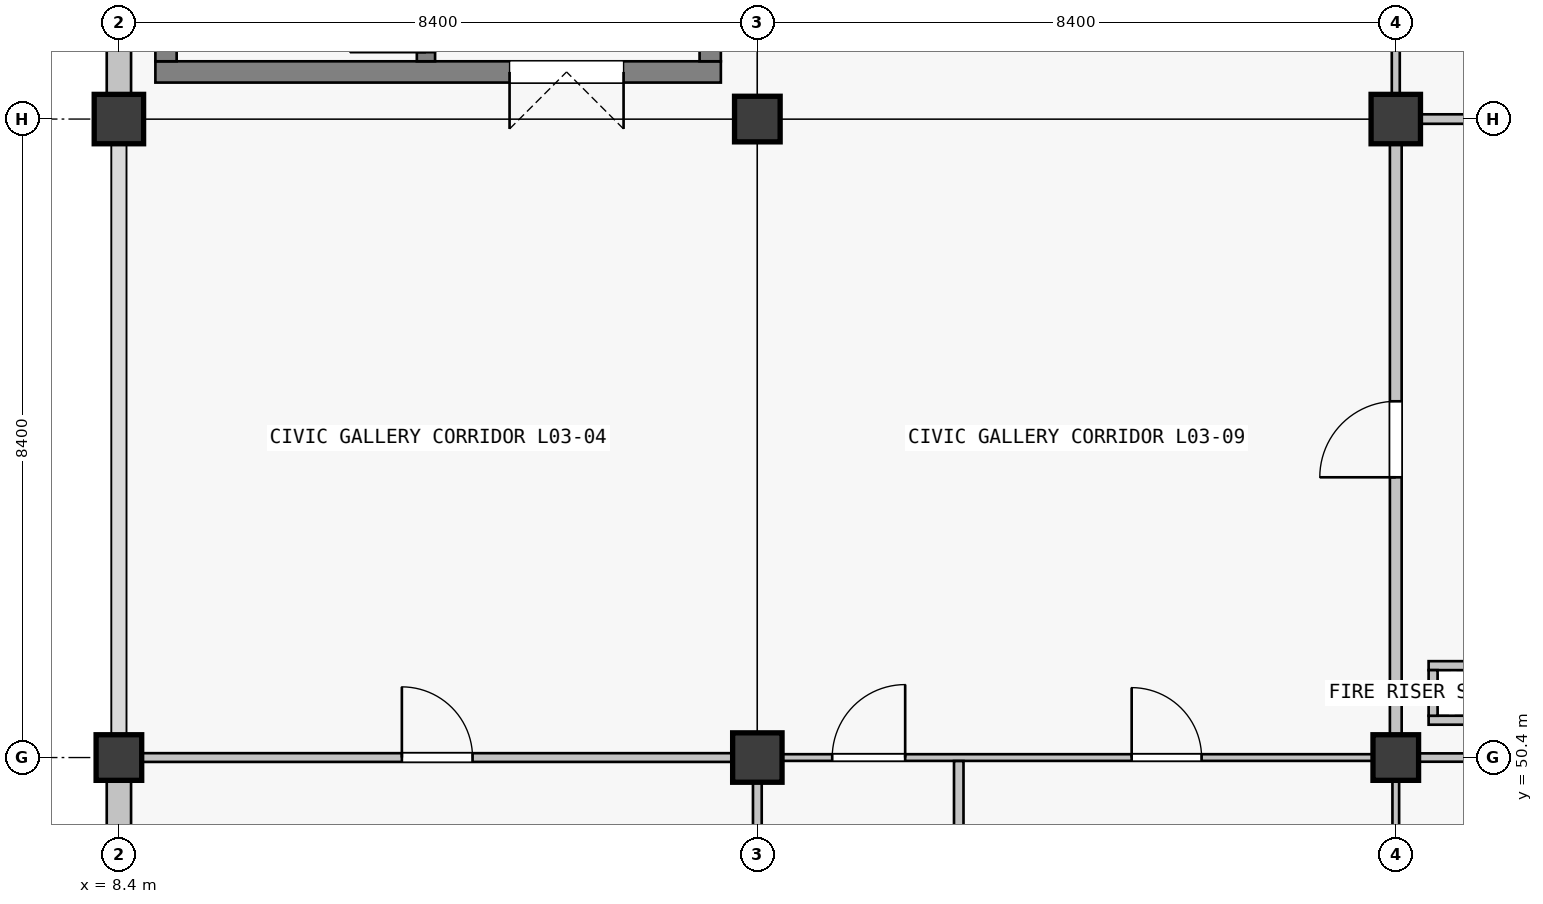
"""IFC4 building model, lengths in metres.
Left out: names, types, materials, properties, quantities, classifications, styles, units other than length and angle.
Written with IfcOpenShell. Run it as: python <this file> out.ifc"""

import sys

from ifc_helpers import new_model, si_unit, direction, frame, frame_2d, origin, origin_2d, place, context, subcontext, project, spatial, rectangle, extrude, element, fill, save


model = new_model("IFC4")
c1 = context("Model", 3, precision=1e-05, world=origin(), true_north=direction((0.0, 1.0)))
c2 = subcontext(c1, "Body", "Model", "MODEL_VIEW")
j1 = project(units=[si_unit("LENGTHUNIT", "METRE"), si_unit("PLANEANGLEUNIT", "RADIAN")], contexts=[c1])
p1 = place(None, origin())
s1 = spatial("IfcSite", under=j1, at=p1, CompositionType="ELEMENT")
p2 = place(p1, origin())
s2 = spatial("IfcBuilding", under=s1, at=p2, CompositionType="ELEMENT")
p3 = place(p2, frame((0.0, 0.0, 14.76)))
s3 = spatial("IfcBuildingStorey", under=s2, at=p3, CompositionType="ELEMENT", Elevation=14.76)
p4 = place(p3, frame((8.4, 50.4, 0.0), z_axis=(0.0, 0.0, 1.0), x_axis=(1.0, 0.0, 0.0)))
e1 = element("IfcColumn", 1, at=p4, inside=s3, PredefinedType="COLUMN", context=c2, shape_type="SweptSolid", body=[
    extrude(rectangle(XDim=0.6, YDim=0.6, at=origin_2d()), origin(), (0.0, 0.0, 1.0), 4.32),
])
for number, where, z_axis, x_axis in (
    (2, (8.4, 58.8, 0.0), (0.0, 0.0, 1.0), (1.0, 0.0, 0.0)),
    (3, (16.8, 50.4, 0.0), (0.0, 0.0, 1.0), (1.0, 0.0, 0.0)),
):
    element("IfcColumn", number, at=place(p3, frame(where, z_axis=z_axis, x_axis=x_axis)), inside=s3, PredefinedType="COLUMN", context=c2, shape_type="SweptSolid", body=[
        extrude(rectangle(XDim=0.65, YDim=0.65, at=origin_2d()), origin(), (0.0, 0.0, 1.0), 4.32),
    ])
for number, where, z_axis, x_axis in (
    (4, (16.8, 58.8, 0.0), (0.0, 0.0, 1.0), (1.0, 0.0, 0.0)),
    (5, (25.2, 50.4, 0.0), (0.0, 0.0, 1.0), (1.0, 0.0, 0.0)),
):
    element("IfcColumn", number, at=place(p3, frame(where, z_axis=z_axis, x_axis=x_axis)), inside=s3, PredefinedType="COLUMN", context=c2, shape_type="SweptSolid", body=[
        extrude(rectangle(XDim=0.6, YDim=0.6, at=origin_2d()), origin(), (0.0, 0.0, 1.0), 4.32),
    ])
p5 = place(p3, frame((25.2, 58.8, 0.0), z_axis=(0.0, 0.0, 1.0), x_axis=(1.0, 0.0, 0.0)))
e6 = element("IfcColumn", 6, at=p5, inside=s3, PredefinedType="COLUMN", context=c2, shape_type="SweptSolid", body=[
    extrude(rectangle(XDim=0.65, YDim=0.65, at=origin_2d()), origin(), (0.0, 0.0, 1.0), 4.32),
])
p6 = place(p3, frame((8.4, 42.326, 0.0), z_axis=(0.0, 0.0, 1.0), x_axis=(0.0, 1.0, 0.0)))
e7 = element("IfcWall", 7, at=p6, inside=s3, PredefinedType="SOLIDWALL", context=c2, shape_type="SweptSolid", body=[
    extrude(rectangle(XDim=7.773, YDim=0.32, at=frame_2d((3.887, 0.0))), origin(), (0.0, 0.0, 1.0), 3.37),
])
p7 = place(p6, frame((2.536, 0.0, 0.9)))
e8 = element("IfcOpeningElement", 8, at=p7, cuts=e7, PredefinedType="OPENING", context=c2, shape_type="SweptSolid", body=[
    extrude(rectangle(XDim=2.7, YDim=1.2, at=frame_2d((1.35, 0.6))), frame((0.0, 0.16, 0.0), z_axis=(0.0, -1.0, 0.0), x_axis=(1.0, 0.0, 0.0)), (0.0, 0.0, 1.0), 0.32),
])
p8 = place(p3, frame((8.4, 59.126, 0.0), z_axis=(0.0, 0.0, 1.0), x_axis=(0.0, 1.0, 0.0)))
e9 = element("IfcWall", 9, at=p8, inside=s3, PredefinedType="SOLIDWALL", context=c2, shape_type="SweptSolid", body=[
    extrude(rectangle(XDim=7.773, YDim=0.32, at=frame_2d((3.886, 0.0))), origin(), (0.0, 0.0, 1.0), 3.37),
])
p9 = place(p3, frame((16.32, 59.42, 0.0), z_axis=(0.0, 0.0, 1.0), x_axis=(-1.0, 0.0, 0.0)))
e10 = element("IfcWall", 10, at=p9, inside=s3, PredefinedType="SHEAR", context=c2, shape_type="SweptSolid", body=[
    extrude(rectangle(XDim=7.44, YDim=0.28, at=frame_2d((3.72, 0.0))), origin(), (0.0, 0.0, 1.0), 4.32),
])
p10 = place(p9, frame((1.28, 0.0, 0.0)))
e11 = element("IfcOpeningElement", 11, at=p10, cuts=e10, PredefinedType="OPENING", context=c2, shape_type="SweptSolid", body=[
    extrude(rectangle(XDim=1.5, YDim=2.15, at=frame_2d((0.75, 1.075))), frame((0.0, 0.14, 0.0), z_axis=(0.0, -1.0, 0.0), x_axis=(1.0, 0.0, 0.0)), (0.0, 0.0, 1.0), 0.28),
])
for number, where, z_axis, x_axis in (
    (12, (9.02, 59.56, 0.0), (0.0, 0.0, 1.0), (0.0, 1.0, 0.0)),
    (13, (16.18, 66.44, 0.0), (0.0, 0.0, 1.0), (0.0, -1.0, 0.0)),
):
    element("IfcWall", number, at=place(p3, frame(where, z_axis=z_axis, x_axis=x_axis)), inside=s3, PredefinedType="SHEAR", context=c2, shape_type="SweptSolid", body=[
        extrude(rectangle(XDim=6.88, YDim=0.28, at=frame_2d((3.44, 0.0))), origin(), (0.0, 0.0, 1.0), 4.32),
    ])
p11 = place(p3, frame((12.44, 59.56, 0.0), z_axis=(0.0, 0.0, 1.0), x_axis=(0.0, 1.0, 0.0)))
e14 = element("IfcWall", 14, at=p11, inside=s3, PredefinedType="SHEAR", context=c2, shape_type="SweptSolid", body=[
    extrude(rectangle(XDim=6.88, YDim=0.24, at=frame_2d((3.44, 0.0))), origin(), (0.0, 0.0, 1.0), 4.32),
])
p12 = place(p11, frame((0.12, 0.0, 0.0)))
e15 = element("IfcOpeningElement", 15, at=p12, cuts=e14, PredefinedType="OPENING", context=c2, shape_type="SweptSolid", body=[
    extrude(rectangle(XDim=1.0, YDim=2.15, at=frame_2d((0.5, 1.075))), frame((0.0, 0.12, 0.0), z_axis=(0.0, -1.0, 0.0), x_axis=(1.0, 0.0, 0.0)), (0.0, 0.0, 1.0), 0.24),
])
for number, where, z_axis, x_axis in (
    (16, (25.632, 50.891, 0.0), (0.0, 0.0, 1.0), (1.0, 0.0, 0.0)),
    (17, (25.632, 51.609, 0.0), (0.0, 0.0, 1.0), (1.0, 0.0, 0.0)),
):
    element("IfcWall", number, at=place(p3, frame(where, z_axis=z_axis, x_axis=x_axis)), inside=s3, PredefinedType="PARTITIONING", context=c2, shape_type="SweptSolid", body=[
        extrude(rectangle(XDim=1.036, YDim=0.118, at=frame_2d((0.518, 0.0))), origin(), (0.0, 0.0, 1.0), 3.35),
    ])
p13 = place(p3, frame((25.691, 50.95, 0.0), z_axis=(0.0, 0.0, 1.0), x_axis=(0.0, 1.0, 0.0)))
e18 = element("IfcWall", 18, at=p13, inside=s3, PredefinedType="PARTITIONING", context=c2, shape_type="SweptSolid", body=[
    extrude(rectangle(XDim=0.6, YDim=0.118, at=frame_2d((0.3, 0.0))), origin(), (0.0, 0.0, 1.0), 3.35),
])
p14 = place(p3, frame((8.702, 50.4, 0.0), z_axis=(0.0, 0.0, 1.0), x_axis=(1.0, 0.0, 0.0)))
e19 = element("IfcWall", 19, at=p14, inside=s3, PredefinedType="PARTITIONING", context=c2, shape_type="SweptSolid", body=[
    extrude(rectangle(XDim=7.771, YDim=0.115, at=frame_2d((3.885, 0.0))), origin(), (0.0, 0.0, 1.0), 3.19),
])
p15 = place(p14, frame((3.421, 0.0, 0.0)))
e20 = element("IfcOpeningElement", 20, at=p15, cuts=e19, PredefinedType="OPENING", context=c2, shape_type="SweptSolid", body=[
    extrude(rectangle(XDim=0.93, YDim=2.12, at=frame_2d((0.465, 1.06))), frame((0.0, 0.058, 0.0), z_axis=(0.0, -1.0, 0.0), x_axis=(1.0, 0.0, 0.0)), (0.0, 0.0, 1.0), 0.115),
])
p16 = place(p3, frame((17.127, 50.4, 0.0), z_axis=(0.0, 0.0, 1.0), x_axis=(1.0, 0.0, 0.0)))
e21 = element("IfcWall", 21, at=p16, inside=s3, PredefinedType="PARTITIONING", context=c2, shape_type="SweptSolid", body=[
    extrude(rectangle(XDim=7.771, YDim=0.088, at=frame_2d((3.885, 0.0))), origin(), (0.0, 0.0, 1.0), 3.19),
])
p17 = place(p16, frame((0.658, 0.0, 0.0)))
e22 = element("IfcOpeningElement", 22, at=p17, cuts=e21, PredefinedType="OPENING", context=c2, shape_type="SweptSolid", body=[
    extrude(rectangle(XDim=0.96, YDim=2.1, at=frame_2d((0.48, 1.05))), frame((0.0, 0.044, 0.0), z_axis=(0.0, -1.0, 0.0), x_axis=(1.0, 0.0, 0.0)), (0.0, 0.0, 1.0), 0.088),
])
p18 = place(p16, frame((4.598, 0.0, 0.0)))
e23 = element("IfcOpeningElement", 23, at=p18, cuts=e21, PredefinedType="OPENING", context=c2, shape_type="SweptSolid", body=[
    extrude(rectangle(XDim=0.92, YDim=2.1, at=frame_2d((0.46, 1.05))), frame((0.0, 0.044, 0.0), z_axis=(0.0, -1.0, 0.0), x_axis=(1.0, 0.0, 0.0)), (0.0, 0.0, 1.0), 0.088),
])
p19 = place(p3, frame((25.502, 50.4, 0.0), z_axis=(0.0, 0.0, 1.0), x_axis=(1.0, 0.0, 0.0)))
e24 = element("IfcWall", 24, at=p19, inside=s3, PredefinedType="MOVABLE", context=c2, shape_type="SweptSolid", body=[
    extrude(rectangle(XDim=7.771, YDim=0.11, at=frame_2d((3.885, 0.0))), origin(), (0.0, 0.0, 1.0), 3.19),
])
p20 = place(p19, frame((3.381, 0.0, 0.0)))
e25 = element("IfcOpeningElement", 25, at=p20, cuts=e24, PredefinedType="OPENING", context=c2, shape_type="SweptSolid", body=[
    extrude(rectangle(XDim=1.01, YDim=2.12, at=frame_2d((0.505, 1.06))), frame((0.0, 0.055, 0.0), z_axis=(0.0, -1.0, 0.0), x_axis=(1.0, 0.0, 0.0)), (0.0, 0.0, 1.0), 0.11),
])
p21 = place(p3, frame((25.527, 58.8, 0.0), z_axis=(0.0, 0.0, 1.0), x_axis=(1.0, 0.0, 0.0)))
e26 = element("IfcWall", 26, at=p21, inside=s3, PredefinedType="PARTITIONING", context=c2, shape_type="SweptSolid", body=[
    extrude(rectangle(XDim=7.771, YDim=0.125, at=frame_2d((3.885, 0.0))), origin(), (0.0, 0.0, 1.0), 3.19),
])
p22 = place(p21, frame((3.401, 0.0, 0.0)))
e27 = element("IfcOpeningElement", 27, at=p22, cuts=e26, PredefinedType="OPENING", context=c2, shape_type="SweptSolid", body=[
    extrude(rectangle(XDim=0.97, YDim=2.12, at=frame_2d((0.485, 1.06))), frame((0.0, 0.062, 0.0), z_axis=(0.0, -1.0, 0.0), x_axis=(1.0, 0.0, 0.0)), (0.0, 0.0, 1.0), 0.125),
])
p23 = place(p3, frame((16.8, 42.302, 0.0), z_axis=(0.0, 0.0, 1.0), x_axis=(0.0, 1.0, 0.0)))
e28 = element("IfcWall", 28, at=p23, inside=s3, PredefinedType="PARTITIONING", context=c2, shape_type="SweptSolid", body=[
    extrude(rectangle(XDim=7.771, YDim=0.115, at=frame_2d((3.885, 0.0))), origin(), (0.0, 0.0, 1.0), 3.19),
])
p24 = place(p3, frame((25.2, 42.327, 0.0), z_axis=(0.0, 0.0, 1.0), x_axis=(0.0, 1.0, 0.0)))
e29 = element("IfcWall", 29, at=p24, inside=s3, PredefinedType="PARTITIONING", context=c2, shape_type="SweptSolid", body=[
    extrude(rectangle(XDim=7.771, YDim=0.088, at=frame_2d((3.885, 0.0))), origin(), (0.0, 0.0, 1.0), 3.19),
])
p25 = place(p3, frame((25.2, 50.702, 0.0), z_axis=(0.0, 0.0, 1.0), x_axis=(0.0, 1.0, 0.0)))
e30 = element("IfcWall", 30, at=p25, inside=s3, PredefinedType="PARTITIONING", context=c2, shape_type="SweptSolid", body=[
    extrude(rectangle(XDim=7.771, YDim=0.155, at=frame_2d((3.885, 0.0))), origin(), (0.0, 0.0, 1.0), 3.19),
])
p26 = place(p25, frame((3.385, 0.0, 0.0)))
e31 = element("IfcOpeningElement", 31, at=p26, cuts=e30, PredefinedType="OPENING", context=c2, shape_type="SweptSolid", body=[
    extrude(rectangle(XDim=1.0, YDim=2.2, at=frame_2d((0.5, 1.1))), frame((0.0, 0.078, 0.0), z_axis=(0.0, -1.0, 0.0), x_axis=(1.0, 0.0, 0.0)), (0.0, 0.0, 1.0), 0.155),
])
p27 = place(p3, frame((25.2, 59.127, 0.0), z_axis=(0.0, 0.0, 1.0), x_axis=(0.0, 1.0, 0.0)))
e32 = element("IfcWall", 32, at=p27, inside=s3, PredefinedType="PARTITIONING", context=c2, shape_type="SweptSolid", body=[
    extrude(rectangle(XDim=7.771, YDim=0.105, at=frame_2d((3.885, 0.0))), origin(), (0.0, 0.0, 1.0), 3.19),
])
p28 = place(p27, frame((3.396, 0.0, 0.0)))
e33 = element("IfcOpeningElement", 33, at=p28, cuts=e32, PredefinedType="OPENING", context=c2, shape_type="SweptSolid", body=[
    extrude(rectangle(XDim=0.98, YDim=2.18, at=frame_2d((0.49, 1.09))), frame((0.0, 0.052, 0.0), z_axis=(0.0, -1.0, 0.0), x_axis=(1.0, 0.0, 0.0)), (0.0, 0.0, 1.0), 0.105),
])
p29 = place(p3, frame((19.45, 42.07, 0.0), z_axis=(0.0, 0.0, 1.0), x_axis=(0.0, 1.0, 0.0)))
e34 = element("IfcWall", 34, at=p29, inside=s3, PredefinedType="PARTITIONING", context=c2, shape_type="SweptSolid", body=[
    extrude(rectangle(XDim=8.284, YDim=0.125, at=frame_2d((4.142, 0.0))), origin(), (0.0, 0.0, 1.0), 3.19),
])
p30 = place(p10, origin())
e35 = element("IfcDoor", 35, at=p30, inside=s3, OperationType="DOUBLE_DOOR_SINGLE_SWING", PredefinedType="DOOR", context=c2, shape_type="SweptSolid", body=[
    extrude(rectangle(XDim=1.5, YDim=2.15, at=frame_2d((0.75, 1.075))), frame((0.0, 0.025, 0.0), z_axis=(0.0, -1.0, 0.0), x_axis=(1.0, 0.0, 0.0)), (0.0, 0.0, 1.0), 0.05),
])
fill(e11, e35)
p31 = place(p17, origin())
e36 = element("IfcDoor", 36, at=p31, inside=s3, OperationType="SINGLE_SWING_RIGHT", PredefinedType="DOOR", context=c2, shape_type="SweptSolid", body=[
    extrude(rectangle(XDim=0.96, YDim=2.1, at=frame_2d((0.48, 1.05))), frame((0.0, 0.025, 0.0), z_axis=(0.0, -1.0, 0.0), x_axis=(1.0, 0.0, 0.0)), (0.0, 0.0, 1.0), 0.05),
])
fill(e22, e36)
p32 = place(p18, origin())
e37 = element("IfcDoor", 37, at=p32, inside=s3, OperationType="SINGLE_SWING_LEFT", PredefinedType="DOOR", context=c2, shape_type="SweptSolid", body=[
    extrude(rectangle(XDim=0.92, YDim=2.1, at=frame_2d((0.46, 1.05))), frame((0.0, 0.025, 0.0), z_axis=(0.0, -1.0, 0.0), x_axis=(1.0, 0.0, 0.0)), (0.0, 0.0, 1.0), 0.05),
])
fill(e23, e37)
p33 = place(p15, origin())
e38 = element("IfcDoor", 38, at=p33, inside=s3, OperationType="SINGLE_SWING_LEFT", PredefinedType="DOOR", context=c2, shape_type="SweptSolid", body=[
    extrude(rectangle(XDim=0.93, YDim=2.12, at=frame_2d((0.465, 1.06))), frame((0.0, 0.025, 0.0), z_axis=(0.0, -1.0, 0.0), x_axis=(1.0, 0.0, 0.0)), (0.0, 0.0, 1.0), 0.05),
])
fill(e20, e38)
p34 = place(p26, origin())
e39 = element("IfcDoor", 39, at=p34, inside=s3, OperationType="SINGLE_SWING_LEFT", PredefinedType="DOOR", context=c2, shape_type="SweptSolid", body=[
    extrude(rectangle(XDim=1.0, YDim=2.2, at=frame_2d((0.5, 1.1))), frame((0.0, 0.025, 0.0), z_axis=(0.0, -1.0, 0.0), x_axis=(1.0, 0.0, 0.0)), (0.0, 0.0, 1.0), 0.05),
])
fill(e31, e39)
save(model, sys.argv[1])
